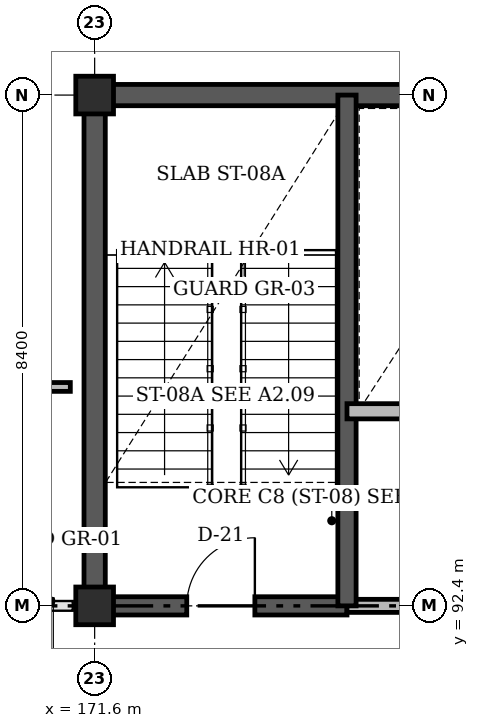
"""IFC4 building model, lengths in metres.
Left out: names, types, materials, properties, quantities, classifications, styles, units other than length and angle.
Written with IfcOpenShell. Run it as: python <this file> out.ifc"""

import sys

from ifc_helpers import new_model, si_unit, direction, frame, frame_2d, origin, origin_2d, place, context, subcontext, project, spatial, rectangle, extrude, element, fill, save


model = new_model("IFC4")
c1 = context("Model", 3, precision=1e-05, world=origin(), true_north=direction((0.0, 1.0)))
c2 = subcontext(c1, "Body", "Model", "MODEL_VIEW")
j1 = project(units=[si_unit("LENGTHUNIT", "METRE"), si_unit("PLANEANGLEUNIT", "RADIAN")], contexts=[c1])
p1 = place(None, origin())
s1 = spatial("IfcSite", under=j1, at=p1, CompositionType="ELEMENT")
p2 = place(p1, origin())
s2 = spatial("IfcBuilding", under=s1, at=p2, CompositionType="ELEMENT")
p3 = place(p2, frame((0.0, 0.0, 9.6)))
s3 = spatial("IfcBuildingStorey", under=s2, at=p3, CompositionType="ELEMENT", Elevation=9.6)
p4 = place(p3, frame((171.425, 100.8, 0.0), z_axis=(0.0, 0.0, 1.0), x_axis=(1.0, 0.0, 0.0)))
e1 = element("IfcWall", 1, at=p4, inside=s3, PredefinedType="SHEAR", context=c2, shape_type="SweptSolid", body=[
    extrude(rectangle(XDim=8.15, YDim=0.35, at=frame_2d((4.075, 0.0))), origin(), (0.0, 0.0, 1.0), 4.48),
])
p5 = place(p3, frame((171.6, 92.4, 0.0), z_axis=(0.0, 0.0, 1.0), x_axis=(0.0, 1.0, 0.0)))
e2 = element("IfcWall", 2, at=p5, inside=s3, PredefinedType="SHEAR", context=c2, shape_type="SweptSolid", body=[
    extrude(rectangle(XDim=8.4, YDim=0.35, at=frame_2d((4.2, 0.0))), origin(), (0.0, 0.0, 1.0), 4.48),
])
for number, where, z_axis, x_axis in (
    (3, (171.6, 92.4, 0.0), (0.0, 0.0, 1.0), (1.0, 0.0, 0.0)),
    (4, (171.6, 100.8, 0.0), (0.0, 0.0, 1.0), (1.0, 0.0, 0.0)),
):
    element("IfcColumn", number, at=place(p3, frame(where, z_axis=z_axis, x_axis=x_axis)), inside=s3, PredefinedType="COLUMN", context=c2, shape_type="SweptSolid", body=[
        extrude(rectangle(XDim=0.62, YDim=0.62, at=origin_2d()), origin(), (0.0, 0.0, 1.0), 4.8),
    ])
p6 = place(p3, frame((171.6, 92.4, 0.0), z_axis=(0.0, 0.0, 1.0), x_axis=(1.0, 0.0, 0.0)))
e5 = element("IfcWall", 5, at=p6, inside=s3, PredefinedType="SHEAR", context=c2, shape_type="SweptSolid", body=[
    extrude(rectangle(XDim=4.15, YDim=0.3, at=frame_2d((2.075, 0.0))), origin(), (0.0, 0.0, 1.0), 4.8),
])
p7 = place(p6, frame((1.515, 0.0, 0.0)))
e6 = element("IfcOpeningElement", 6, at=p7, cuts=e5, PredefinedType="OPENING", context=c2, shape_type="SweptSolid", body=[
    extrude(rectangle(XDim=1.12, YDim=2.15, at=frame_2d((0.56, 1.075))), frame((0.0, 0.16, 0.0), z_axis=(0.0, -1.0, 0.0), x_axis=(1.0, 0.0, 0.0)), (0.0, 0.0, 1.0), 0.32),
])
p8 = place(p3, frame((175.75, 92.4, 0.0), z_axis=(0.0, 0.0, 1.0), x_axis=(1.0, 0.0, 0.0)))
e7 = element("IfcWall", 7, at=p8, inside=s3, PredefinedType="STANDARD", context=c2, shape_type="SweptSolid", body=[
    extrude(rectangle(XDim=3.29, YDim=0.215, at=frame_2d((1.645, 0.0))), origin(), (0.0, 0.0, 1.0), 3.73),
])
p9 = place(p8, frame((0.925, 0.0, 0.0)))
e8 = element("IfcOpeningElement", 8, at=p9, cuts=e7, PredefinedType="OPENING", context=c2, shape_type="SweptSolid", body=[
    extrude(rectangle(XDim=1.44, YDim=2.2, at=frame_2d((0.72, 1.1))), frame((0.0, 0.118, 0.0), z_axis=(0.0, -1.0, 0.0), x_axis=(1.0, 0.0, 0.0)), (0.0, 0.0, 1.0), 0.235),
])
p10 = place(p3, frame((175.75, 92.4, 0.0), z_axis=(0.0, 0.0, 1.0), x_axis=(0.0, 1.0, 0.0)))
e9 = element("IfcWall", 9, at=p10, inside=s3, PredefinedType="SHEAR", context=c2, shape_type="SweptSolid", body=[
    extrude(rectangle(XDim=8.4, YDim=0.3, at=frame_2d((4.2, 0.0))), origin(), (0.0, 0.0, 1.0), 4.8),
])
p11 = place(p3, frame((175.75, 95.6, 0.0), z_axis=(0.0, 0.0, 1.0), x_axis=(1.0, 0.0, 0.0)))
e10 = element("IfcWall", 10, at=p11, inside=s3, PredefinedType="STANDARD", context=c2, shape_type="SweptSolid", body=[
    extrude(rectangle(XDim=3.5, YDim=0.25, at=frame_2d((1.75, 0.0))), origin(), (0.0, 0.0, 1.0), 4.46),
])
p12 = place(p11, frame((1.2, 0.0, 0.0)))
e11 = element("IfcOpeningElement", 11, at=p12, cuts=e10, PredefinedType="OPENING", context=c2, shape_type="SweptSolid", body=[
    extrude(rectangle(XDim=1.1, YDim=2.2, at=frame_2d((0.55, 1.1))), frame((0.0, 0.135, 0.0), z_axis=(0.0, -1.0, 0.0), x_axis=(1.0, 0.0, 0.0)), (0.0, 0.0, 1.0), 0.27),
])
p13 = place(p3, frame((148.0, 96.0, 0.0), z_axis=(0.0, 0.0, 1.0), x_axis=(1.0, 0.0, 0.0)))
e12 = element("IfcWall", 12, at=p13, inside=s3, PredefinedType="PARTITIONING", context=c2, shape_type="SweptSolid", body=[
    extrude(rectangle(XDim=23.2, YDim=0.145, at=frame_2d((11.6, 0.0))), origin(), (0.0, 0.0, 1.0), 4.46),
])
p14 = place(p7, origin())
e13 = element("IfcDoor", 13, at=p14, inside=s3, OperationType="SINGLE_SWING_RIGHT", PredefinedType="DOOR", context=c2, shape_type="SweptSolid", body=[
    extrude(rectangle(XDim=1.12, YDim=2.15, at=frame_2d((0.56, 1.075))), frame((0.0, 0.025, 0.0), z_axis=(0.0, -1.0, 0.0), x_axis=(1.0, 0.0, 0.0)), (0.0, 0.0, 1.0), 0.05),
])
fill(e6, e13)
save(model, sys.argv[1])
